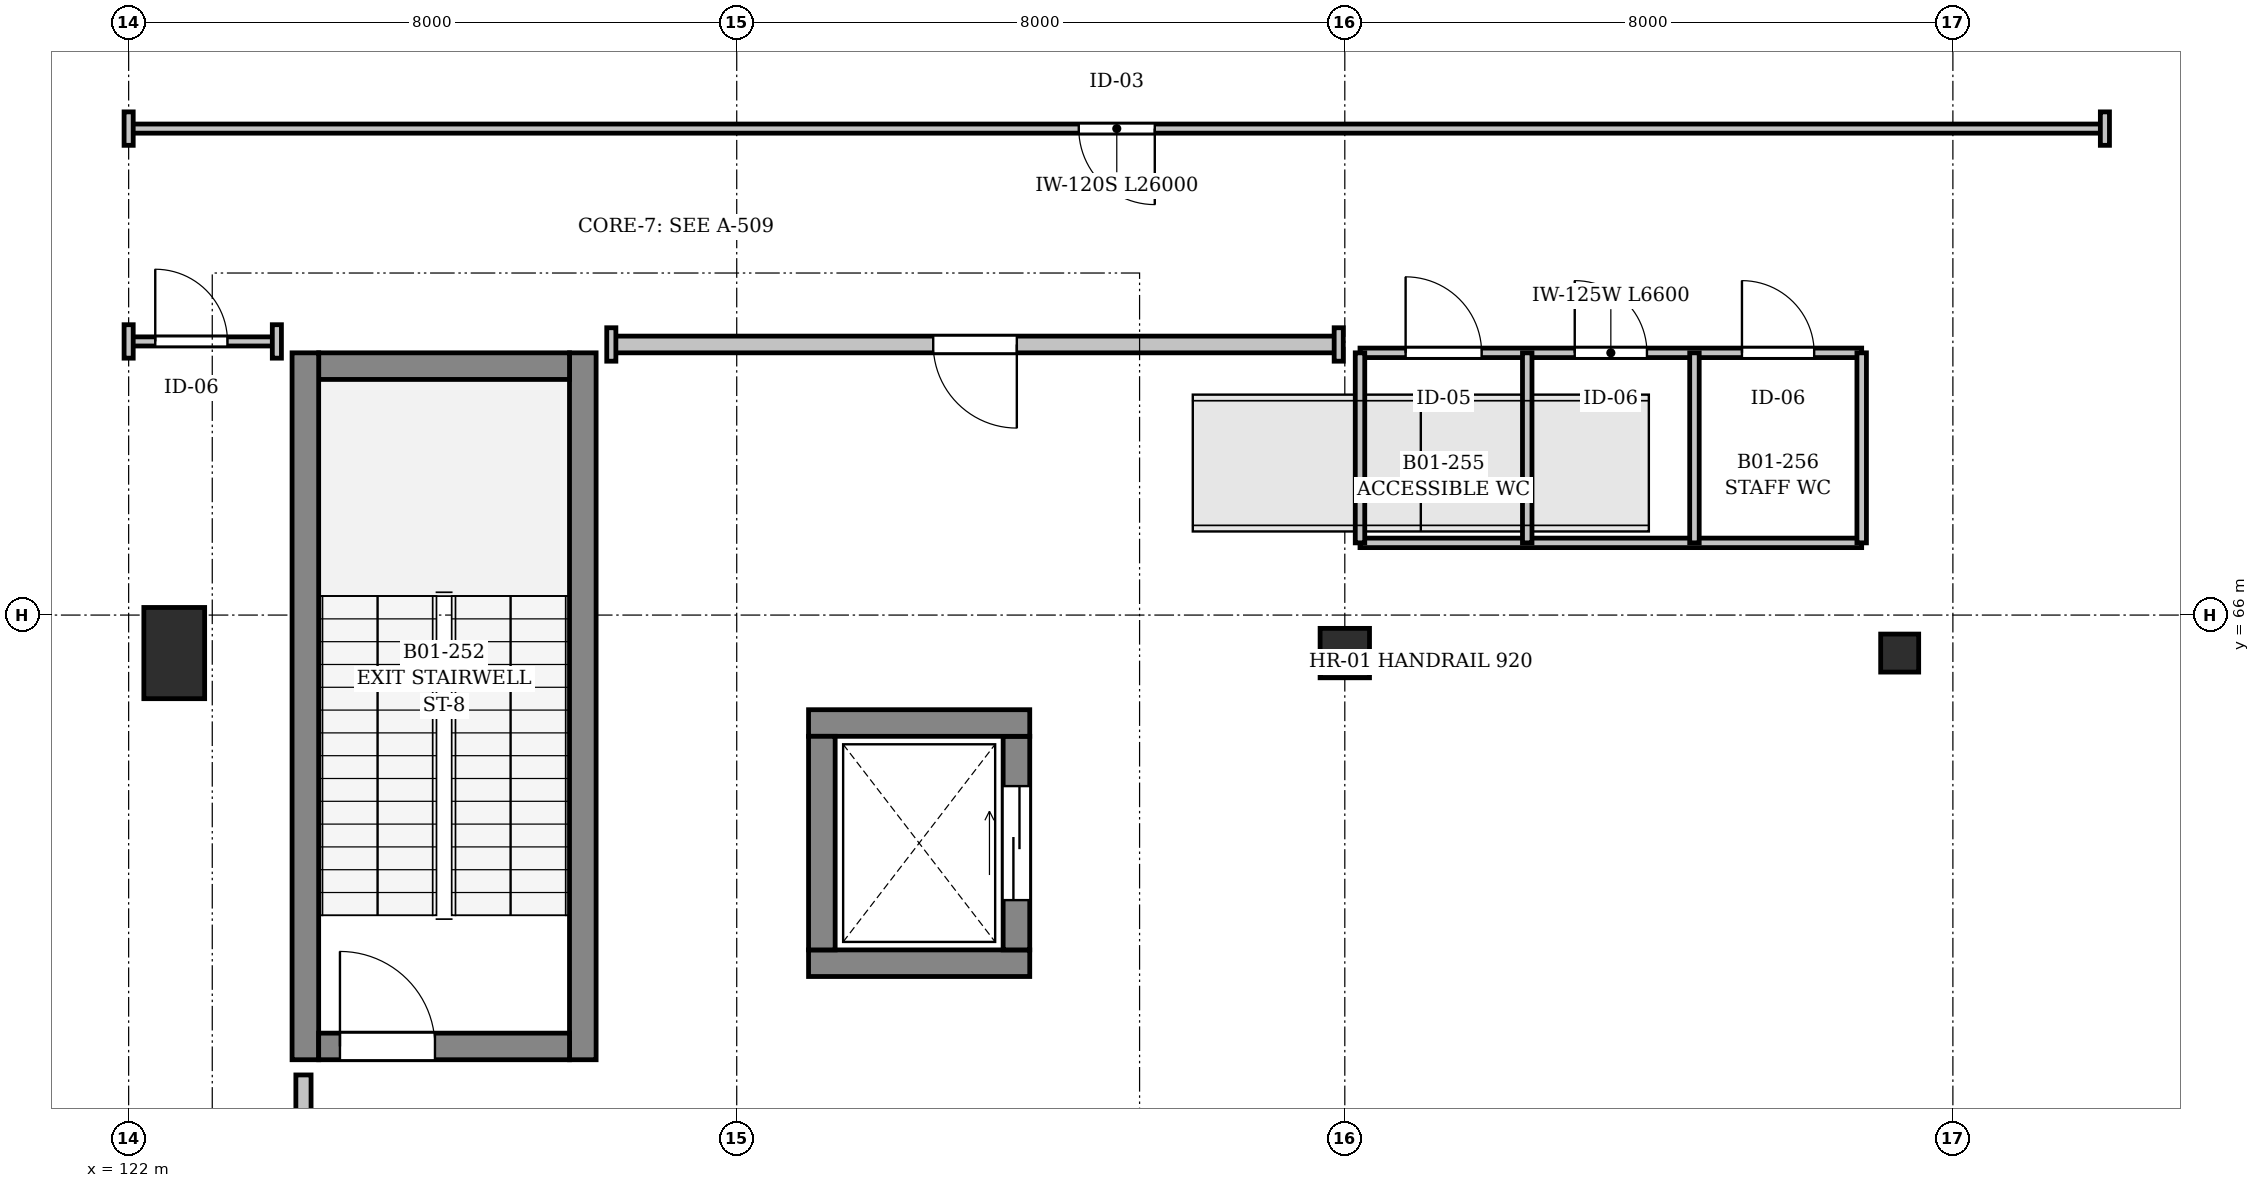
"""IFC4 building model, lengths in metres.
Left out: names, types, materials, properties, quantities, classifications, styles, units other than length and angle.
Written with IfcOpenShell. Run it as: python <this file> out.ifc"""

import sys

from ifc_helpers import new_model, si_unit, direction, frame, frame_2d, origin, origin_2d, place, context, subcontext, project, spatial, rectangle, extrude, element, fill, save


model = new_model("IFC4")
c1 = context("Model", 3, precision=1e-05, world=origin(), true_north=direction((0.0, 1.0)))
c2 = subcontext(c1, "Body", "Model", "MODEL_VIEW")
j1 = project(units=[si_unit("LENGTHUNIT", "METRE"), si_unit("PLANEANGLEUNIT", "RADIAN")], contexts=[c1])
p1 = place(None, origin())
s1 = spatial("IfcSite", under=j1, at=p1, CompositionType="ELEMENT")
p2 = place(p1, origin())
s2 = spatial("IfcBuilding", under=s1, at=p2, CompositionType="ELEMENT")
p3 = place(p2, frame((0.0, 0.0, -5.4)))
s3 = spatial("IfcBuildingStorey", under=s2, at=p3, CompositionType="ELEMENT", Elevation=-5.4)
p4 = place(p3, frame((122.6, 65.5, 0.0), z_axis=(0.0, 0.0, 1.0), x_axis=(1.0, 0.0, 0.0)))
e1 = element("IfcColumn", 1, at=p4, inside=s3, PredefinedType="COLUMN", context=c2, shape_type="SweptSolid", body=[
    extrude(rectangle(XDim=0.8, YDim=1.2, at=origin_2d()), origin(), (0.0, 0.0, 1.0), 4.98),
])
p5 = place(p3, frame((138.0, 65.5, 0.0), z_axis=(0.0, 0.0, 1.0), x_axis=(1.0, 0.0, 0.0)))
e2 = element("IfcColumn", 2, at=p5, inside=s3, PredefinedType="COLUMN", context=c2, shape_type="SweptSolid", body=[
    extrude(rectangle(XDim=0.65, YDim=0.65, at=origin_2d()), origin(), (0.0, 0.0, 1.0), 4.98),
])
p6 = place(p3, frame((145.3, 65.5, 0.0), z_axis=(0.0, 0.0, 1.0), x_axis=(1.0, 0.0, 0.0)))
e3 = element("IfcColumn", 3, at=p6, inside=s3, PredefinedType="COLUMN", context=c2, shape_type="SweptSolid", body=[
    extrude(rectangle(XDim=0.5, YDim=0.5, at=origin_2d()), origin(), (0.0, 0.0, 1.0), 4.98),
])
p7 = place(p3, frame((127.975, 60.15, 0.0), z_axis=(0.0, 0.0, 1.0), x_axis=(0.0, 1.0, 0.0)))
e4 = element("IfcWall", 4, at=p7, inside=s3, PredefinedType="SHEAR", context=c2, shape_type="SweptSolid", body=[
    extrude(rectangle(XDim=9.3, YDim=0.35, at=frame_2d((4.65, 0.0))), origin(), (0.0, 0.0, 1.0), 4.98),
])
p8 = place(p3, frame((127.8, 69.275, 0.0), z_axis=(0.0, 0.0, 1.0), x_axis=(-1.0, 0.0, 0.0)))
e5 = element("IfcWall", 5, at=p8, inside=s3, PredefinedType="SHEAR", context=c2, shape_type="SweptSolid", body=[
    extrude(rectangle(XDim=3.3, YDim=0.35, at=frame_2d((1.65, 0.0))), origin(), (0.0, 0.0, 1.0), 4.98),
])
p9 = place(p3, frame((124.325, 69.45, 0.0), z_axis=(0.0, 0.0, 1.0), x_axis=(0.0, -1.0, 0.0)))
e6 = element("IfcWall", 6, at=p9, inside=s3, PredefinedType="SHEAR", context=c2, shape_type="SweptSolid", body=[
    extrude(rectangle(XDim=9.3, YDim=0.35, at=frame_2d((4.65, 0.0))), origin(), (0.0, 0.0, 1.0), 4.98),
])
p10 = place(p3, frame((124.5, 60.325, 0.0), z_axis=(0.0, 0.0, 1.0), x_axis=(1.0, 0.0, 0.0)))
e7 = element("IfcWall", 7, at=p10, inside=s3, PredefinedType="SHEAR", context=c2, shape_type="SweptSolid", body=[
    extrude(rectangle(XDim=3.3, YDim=0.35, at=frame_2d((1.65, 0.0))), origin(), (0.0, 0.0, 1.0), 4.98),
])
p11 = place(p10, frame((0.28, 0.0, 0.0)))
e8 = element("IfcOpeningElement", 8, at=p11, cuts=e7, PredefinedType="OPENING", context=c2, shape_type="SweptSolid", body=[
    extrude(rectangle(XDim=1.25, YDim=2.2, at=frame_2d((0.625, 1.1))), frame((0.0, 0.185, 0.0), z_axis=(0.0, -1.0, 0.0), x_axis=(1.0, 0.0, 0.0)), (0.0, 0.0, 1.0), 0.37),
])
p12 = place(p3, frame((130.945, 61.42, 0.0), z_axis=(0.0, 0.0, 1.0), x_axis=(1.0, 0.0, 0.0)))
e9 = element("IfcWall", 9, at=p12, inside=s3, PredefinedType="SHEAR", context=c2, shape_type="SweptSolid", body=[
    extrude(rectangle(XDim=2.91, YDim=0.35, at=frame_2d((1.455, 0.0))), origin(), (0.0, 0.0, 1.0), 4.98),
])
p13 = place(p3, frame((133.68, 61.595, 0.0), z_axis=(0.0, 0.0, 1.0), x_axis=(0.0, 1.0, 0.0)))
e10 = element("IfcWall", 10, at=p13, inside=s3, PredefinedType="SHEAR", context=c2, shape_type="SweptSolid", body=[
    extrude(rectangle(XDim=2.81, YDim=0.35, at=frame_2d((1.405, 0.0))), origin(), (0.0, 0.0, 1.0), 4.98),
])
p14 = place(p13, frame((0.655, 0.0, 0.0)))
e11 = element("IfcOpeningElement", 11, at=p14, cuts=e10, PredefinedType="OPENING", context=c2, shape_type="SweptSolid", body=[
    extrude(rectangle(XDim=1.5, YDim=2.3, at=frame_2d((0.75, 1.15))), frame((0.0, 0.185, 0.0), z_axis=(0.0, -1.0, 0.0), x_axis=(1.0, 0.0, 0.0)), (0.0, 0.0, 1.0), 0.37),
])
p15 = place(p3, frame((133.855, 64.58, 0.0), z_axis=(0.0, 0.0, 1.0), x_axis=(-1.0, 0.0, 0.0)))
e12 = element("IfcWall", 12, at=p15, inside=s3, PredefinedType="SHEAR", context=c2, shape_type="SweptSolid", body=[
    extrude(rectangle(XDim=2.91, YDim=0.35, at=frame_2d((1.455, 0.0))), origin(), (0.0, 0.0, 1.0), 4.98),
])
p16 = place(p3, frame((131.12, 64.405, 0.0), z_axis=(0.0, 0.0, 1.0), x_axis=(0.0, -1.0, 0.0)))
e13 = element("IfcWall", 13, at=p16, inside=s3, PredefinedType="SHEAR", context=c2, shape_type="SweptSolid", body=[
    extrude(rectangle(XDim=2.81, YDim=0.35, at=frame_2d((1.405, 0.0))), origin(), (0.0, 0.0, 1.0), 4.98),
])
p17 = place(p3, frame((138.2, 69.45, 0.0), z_axis=(0.0, 0.0, 1.0), x_axis=(1.0, 0.0, 0.0)))
e14 = element("IfcWall", 14, at=p17, inside=s3, PredefinedType="PARTITIONING", context=c2, shape_type="SweptSolid", body=[
    extrude(rectangle(XDim=6.6, YDim=0.125, at=frame_2d((3.3, 0.0))), origin(), (0.0, 0.0, 1.0), 4.22),
])
p18 = place(p17, frame((0.6, 0.0, 0.0)))
e15 = element("IfcOpeningElement", 15, at=p18, cuts=e14, PredefinedType="OPENING", context=c2, shape_type="SweptSolid", body=[
    extrude(rectangle(XDim=1.0, YDim=2.2, at=frame_2d((0.5, 1.1))), frame((0.0, 0.073, 0.0), z_axis=(0.0, -1.0, 0.0), x_axis=(1.0, 0.0, 0.0)), (0.0, 0.0, 1.0), 0.145),
])
p19 = place(p17, frame((2.825, 0.0, 0.0)))
e16 = element("IfcOpeningElement", 16, at=p19, cuts=e14, PredefinedType="OPENING", context=c2, shape_type="SweptSolid", body=[
    extrude(rectangle(XDim=0.95, YDim=2.2, at=frame_2d((0.475, 1.1))), frame((0.0, 0.073, 0.0), z_axis=(0.0, -1.0, 0.0), x_axis=(1.0, 0.0, 0.0)), (0.0, 0.0, 1.0), 0.145),
])
p20 = place(p17, frame((5.025, 0.0, 0.0)))
e17 = element("IfcOpeningElement", 17, at=p20, cuts=e14, PredefinedType="OPENING", context=c2, shape_type="SweptSolid", body=[
    extrude(rectangle(XDim=0.95, YDim=2.2, at=frame_2d((0.475, 1.1))), frame((0.0, 0.073, 0.0), z_axis=(0.0, -1.0, 0.0), x_axis=(1.0, 0.0, 0.0)), (0.0, 0.0, 1.0), 0.145),
])
p21 = place(p3, frame((138.2, 66.95, 0.0), z_axis=(0.0, 0.0, 1.0), x_axis=(1.0, 0.0, 0.0)))
e18 = element("IfcWall", 18, at=p21, inside=s3, PredefinedType="PARTITIONING", context=c2, shape_type="SweptSolid", body=[
    extrude(rectangle(XDim=6.6, YDim=0.125, at=frame_2d((3.3, 0.0))), origin(), (0.0, 0.0, 1.0), 4.22),
])
p22 = place(p3, frame((138.2, 66.95, 0.0), z_axis=(0.0, 0.0, 1.0), x_axis=(0.0, 1.0, 0.0)))
e19 = element("IfcWall", 19, at=p22, inside=s3, PredefinedType="PARTITIONING", context=c2, shape_type="SweptSolid", body=[
    extrude(rectangle(XDim=2.5, YDim=0.125, at=frame_2d((1.25, 0.0))), origin(), (0.0, 0.0, 1.0), 4.32),
])
p23 = place(p3, frame((144.8, 66.95, 0.0), z_axis=(0.0, 0.0, 1.0), x_axis=(0.0, 1.0, 0.0)))
e20 = element("IfcWall", 20, at=p23, inside=s3, PredefinedType="PARTITIONING", context=c2, shape_type="SweptSolid", body=[
    extrude(rectangle(XDim=2.5, YDim=0.125, at=frame_2d((1.25, 0.0))), origin(), (0.0, 0.0, 1.0), 4.98),
])
p24 = place(p3, frame((140.4, 66.95, 0.0), z_axis=(0.0, 0.0, 1.0), x_axis=(0.0, 1.0, 0.0)))
e21 = element("IfcWall", 21, at=p24, inside=s3, PredefinedType="PARTITIONING", context=c2, shape_type="SweptSolid", body=[
    extrude(rectangle(XDim=2.5, YDim=0.125, at=frame_2d((1.25, 0.0))), origin(), (0.0, 0.0, 1.0), 4.48),
])
p25 = place(p3, frame((142.6, 66.95, 0.0), z_axis=(0.0, 0.0, 1.0), x_axis=(0.0, 1.0, 0.0)))
e22 = element("IfcWall", 22, at=p25, inside=s3, PredefinedType="PARTITIONING", context=c2, shape_type="SweptSolid", body=[
    extrude(rectangle(XDim=2.5, YDim=0.125, at=frame_2d((1.25, 0.0))), origin(), (0.0, 0.0, 1.0), 4.22),
])
p26 = place(p3, frame((124.3, 59.95, 0.0), z_axis=(0.0, 0.0, 1.0), x_axis=(0.0, -1.0, 0.0)))
e23 = element("IfcWall", 23, at=p26, inside=s3, PredefinedType="PARTITIONING", context=c2, shape_type="SweptSolid", body=[
    extrude(rectangle(XDim=2.5, YDim=0.2, at=frame_2d((1.25, 0.0))), origin(), (0.0, 0.0, 1.0), 4.98),
])
p27 = place(p26, frame((0.625, 0.0, 0.0)))
e24 = element("IfcOpeningElement", 24, at=p27, cuts=e23, PredefinedType="OPENING", context=c2, shape_type="SweptSolid", body=[
    extrude(rectangle(XDim=1.25, YDim=2.2, at=frame_2d((0.625, 1.1))), frame((0.0, 0.11, 0.0), z_axis=(0.0, -1.0, 0.0), x_axis=(1.0, 0.0, 0.0)), (0.0, 0.0, 1.0), 0.22),
])
p28 = place(p3, frame((148.0, 72.4, 0.0), z_axis=(0.0, 0.0, 1.0), x_axis=(-1.0, 0.0, 0.0)))
e25 = element("IfcWall", 25, at=p28, inside=s3, PredefinedType="PARTITIONING", context=c2, shape_type="SweptSolid", body=[
    extrude(rectangle(XDim=26.0, YDim=0.12, at=frame_2d((13.0, 0.0))), origin(), (0.0, 0.0, 1.0), 4.22),
])
p29 = place(p28, frame((12.5, 0.0, 0.0)))
e26 = element("IfcOpeningElement", 26, at=p29, cuts=e25, PredefinedType="OPENING", context=c2, shape_type="SweptSolid", body=[
    extrude(rectangle(XDim=1.0, YDim=2.2, at=frame_2d((0.5, 1.1))), frame((0.0, 0.07, 0.0), z_axis=(0.0, -1.0, 0.0), x_axis=(1.0, 0.0, 0.0)), (0.0, 0.0, 1.0), 0.14),
])
p30 = place(p3, frame((122.0, 69.6, 0.0), z_axis=(0.0, 0.0, 1.0), x_axis=(1.0, 0.0, 0.0)))
e27 = element("IfcWall", 27, at=p30, inside=s3, PredefinedType="PARTITIONING", context=c2, shape_type="SweptSolid", body=[
    extrude(rectangle(XDim=1.95, YDim=0.12, at=frame_2d((0.975, 0.0))), origin(), (0.0, 0.0, 1.0), 4.42),
])
p31 = place(p30, frame((0.35, 0.0, 0.0)))
e28 = element("IfcOpeningElement", 28, at=p31, cuts=e27, PredefinedType="OPENING", context=c2, shape_type="SweptSolid", body=[
    extrude(rectangle(XDim=0.95, YDim=2.2, at=frame_2d((0.475, 1.1))), frame((0.0, 0.07, 0.0), z_axis=(0.0, -1.0, 0.0), x_axis=(1.0, 0.0, 0.0)), (0.0, 0.0, 1.0), 0.14),
])
p32 = place(p3, frame((137.92, 69.56, 0.0), z_axis=(0.0, 0.0, 1.0), x_axis=(-1.0, 0.0, 0.0)))
e29 = element("IfcWall", 29, at=p32, inside=s3, PredefinedType="SOLIDWALL", context=c2, shape_type="SweptSolid", body=[
    extrude(rectangle(XDim=9.57, YDim=0.22, at=frame_2d((4.785, 0.0))), origin(), (0.0, 0.0, 1.0), 4.32),
])
p33 = place(p32, frame((4.235, 0.0, 0.0)))
e30 = element("IfcOpeningElement", 30, at=p33, cuts=e29, PredefinedType="OPENING", context=c2, shape_type="SweptSolid", body=[
    extrude(rectangle(XDim=1.1, YDim=2.2, at=frame_2d((0.55, 1.1))), frame((0.0, 0.12, 0.0), z_axis=(0.0, -1.0, 0.0), x_axis=(1.0, 0.0, 0.0)), (0.0, 0.0, 1.0), 0.24),
])
p34 = place(p3, frame((148.0, 72.62, 0.0), z_axis=(0.0, 0.0, 1.0), x_axis=(0.0, -1.0, 0.0)))
e31 = element("IfcWall", 31, at=p34, inside=s3, PredefinedType="PARTITIONING", context=c2, shape_type="SweptSolid", body=[
    extrude(rectangle(XDim=0.44, YDim=0.12, at=frame_2d((0.22, 0.0))), origin(), (0.0, 0.0, 1.0), 4.32),
])
for number, where, z_axis, x_axis in (
    (32, (122.0, 72.62, 0.0), (0.0, 0.0, 1.0), (0.0, -1.0, 0.0)),
    (33, (122.0, 69.38, 0.0), (0.0, 0.0, 1.0), (0.0, 1.0, 0.0)),
    (34, (123.95, 69.38, 0.0), (0.0, 0.0, 1.0), (0.0, 1.0, 0.0)),
):
    element("IfcWall", number, at=place(p3, frame(where, z_axis=z_axis, x_axis=x_axis)), inside=s3, PredefinedType="PARTITIONING", context=c2, shape_type="SweptSolid", body=[
        extrude(rectangle(XDim=0.44, YDim=0.12, at=frame_2d((0.22, 0.0))), origin(), (0.0, 0.0, 1.0), 4.98),
    ])
p35 = place(p3, frame((137.92, 69.78, 0.0), z_axis=(0.0, 0.0, 1.0), x_axis=(0.0, -1.0, 0.0)))
e35 = element("IfcWall", 35, at=p35, inside=s3, PredefinedType="PARTITIONING", context=c2, shape_type="SweptSolid", body=[
    extrude(rectangle(XDim=0.44, YDim=0.12, at=frame_2d((0.22, 0.0))), origin(), (0.0, 0.0, 1.0), 4.32),
])
p36 = place(p3, frame((128.35, 69.78, 0.0), z_axis=(0.0, 0.0, 1.0), x_axis=(0.0, -1.0, 0.0)))
e36 = element("IfcWall", 36, at=p36, inside=s3, PredefinedType="PARTITIONING", context=c2, shape_type="SweptSolid", body=[
    extrude(rectangle(XDim=0.44, YDim=0.12, at=frame_2d((0.22, 0.0))), origin(), (0.0, 0.0, 1.0), 4.98),
])
p37 = place(p11, origin())
e37 = element("IfcDoor", 37, at=p37, inside=s3, OperationType="SINGLE_SWING_LEFT", PredefinedType="DOOR", context=c2, shape_type="SweptSolid", body=[
    extrude(rectangle(XDim=1.25, YDim=2.2, at=frame_2d((0.625, 1.1))), frame((0.0, 0.025, 0.0), z_axis=(0.0, -1.0, 0.0), x_axis=(1.0, 0.0, 0.0)), (0.0, 0.0, 1.0), 0.05),
])
fill(e8, e37)
p38 = place(p14, origin())
e38 = element("IfcDoor", 38, at=p38, inside=s3, OperationType="SLIDING_TO_LEFT", PredefinedType="DOOR", context=c2, shape_type="SweptSolid", body=[
    extrude(rectangle(XDim=1.5, YDim=2.3, at=frame_2d((0.75, 1.15))), frame((0.0, 0.025, 0.0), z_axis=(0.0, -1.0, 0.0), x_axis=(1.0, 0.0, 0.0)), (0.0, 0.0, 1.0), 0.05),
])
fill(e11, e38)
p39 = place(p18, origin())
e39 = element("IfcDoor", 39, at=p39, inside=s3, OperationType="SINGLE_SWING_LEFT", PredefinedType="DOOR", context=c2, shape_type="SweptSolid", body=[
    extrude(rectangle(XDim=1.0, YDim=2.2, at=frame_2d((0.5, 1.1))), frame((0.0, 0.025, 0.0), z_axis=(0.0, -1.0, 0.0), x_axis=(1.0, 0.0, 0.0)), (0.0, 0.0, 1.0), 0.05),
])
fill(e15, e39)
p40 = place(p19, origin())
e40 = element("IfcDoor", 40, at=p40, inside=s3, OperationType="SINGLE_SWING_RIGHT", PredefinedType="DOOR", context=c2, shape_type="SweptSolid", body=[
    extrude(rectangle(XDim=0.95, YDim=2.2, at=frame_2d((0.475, 1.1))), frame((0.0, 0.025, 0.0), z_axis=(0.0, -1.0, 0.0), x_axis=(1.0, 0.0, 0.0)), (0.0, 0.0, 1.0), 0.05),
])
fill(e16, e40)
p41 = place(p20, origin())
e41 = element("IfcDoor", 41, at=p41, inside=s3, OperationType="SINGLE_SWING_LEFT", PredefinedType="DOOR", context=c2, shape_type="SweptSolid", body=[
    extrude(rectangle(XDim=0.95, YDim=2.2, at=frame_2d((0.475, 1.1))), frame((0.0, 0.025, 0.0), z_axis=(0.0, -1.0, 0.0), x_axis=(1.0, 0.0, 0.0)), (0.0, 0.0, 1.0), 0.05),
])
fill(e17, e41)
p42 = place(p29, origin())
e42 = element("IfcDoor", 42, at=p42, inside=s3, OperationType="SINGLE_SWING_RIGHT", PredefinedType="DOOR", context=c2, shape_type="SweptSolid", body=[
    extrude(rectangle(XDim=1.0, YDim=2.2, at=frame_2d((0.5, 1.1))), frame((0.0, 0.025, 0.0), z_axis=(0.0, -1.0, 0.0), x_axis=(1.0, 0.0, 0.0)), (0.0, 0.0, 1.0), 0.05),
])
fill(e26, e42)
p43 = place(p31, origin())
e43 = element("IfcDoor", 43, at=p43, inside=s3, OperationType="SINGLE_SWING_LEFT", PredefinedType="DOOR", context=c2, shape_type="SweptSolid", body=[
    extrude(rectangle(XDim=0.95, YDim=2.2, at=frame_2d((0.475, 1.1))), frame((0.0, 0.025, 0.0), z_axis=(0.0, -1.0, 0.0), x_axis=(1.0, 0.0, 0.0)), (0.0, 0.0, 1.0), 0.05),
])
fill(e28, e43)
p44 = place(p33, origin())
e44 = element("IfcDoor", 44, at=p44, inside=s3, OperationType="SINGLE_SWING_RIGHT", PredefinedType="DOOR", context=c2, shape_type="SweptSolid", body=[
    extrude(rectangle(XDim=1.1, YDim=2.2, at=frame_2d((0.55, 1.1))), frame((0.0, 0.025, 0.0), z_axis=(0.0, -1.0, 0.0), x_axis=(1.0, 0.0, 0.0)), (0.0, 0.0, 1.0), 0.05),
])
fill(e30, e44)
save(model, sys.argv[1])
